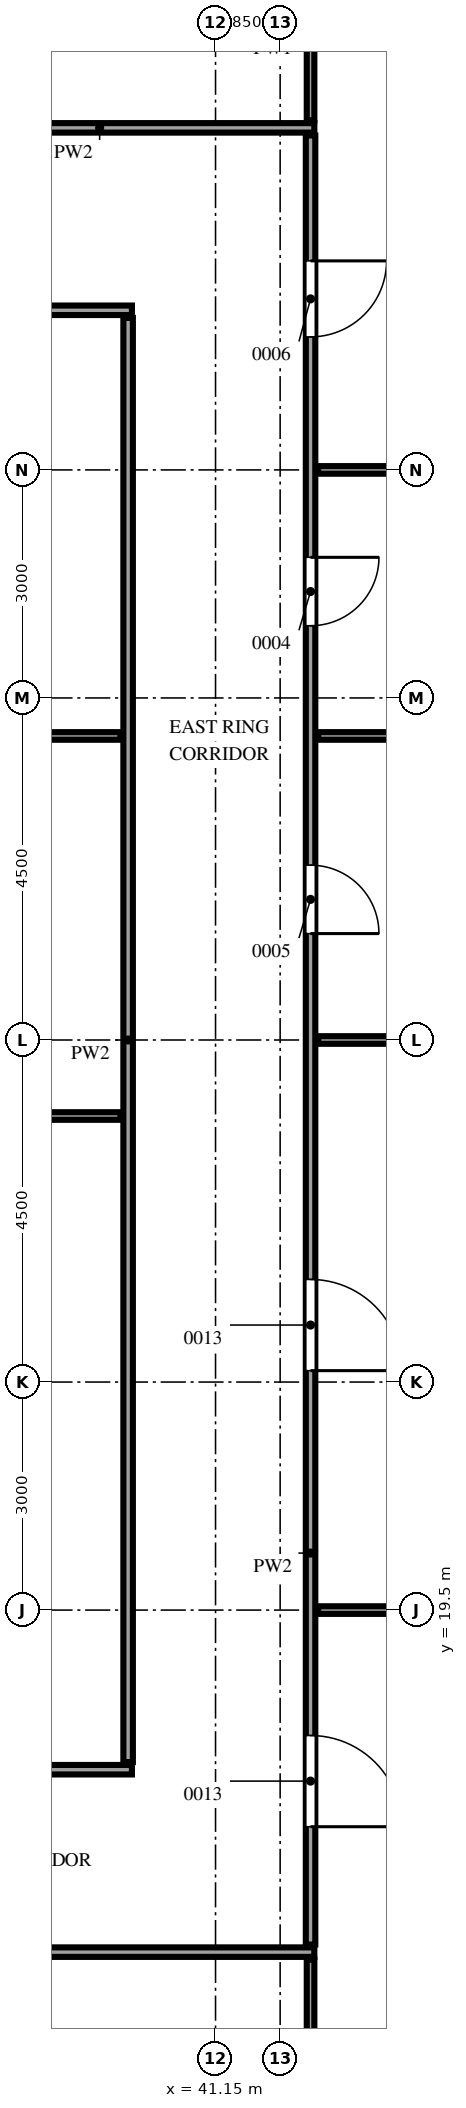
"""IFC4 building model, lengths in metres.
Left out: names, types, materials, properties, quantities, classifications, styles, units other than length and angle.
Written with IfcOpenShell. Run it as: python <this file> out.ifc"""

import sys

from ifc_helpers import new_model, si_unit, direction, frame, frame_2d, origin, place, context, subcontext, project, spatial, rectangle, extrude, source, transform, mapped, element, fill, save


model = new_model("IFC4")
c1 = context("Model", 3, precision=1e-05, world=origin(), true_north=direction((0.0, 1.0)))
c2 = subcontext(c1, "Body", "Model", "MODEL_VIEW")
j1 = project(units=[si_unit("LENGTHUNIT", "METRE"), si_unit("PLANEANGLEUNIT", "RADIAN")], contexts=[c1])
p1 = place(None, origin())
s1 = spatial("IfcSite", under=j1, at=p1, CompositionType="ELEMENT")
p2 = place(p1, origin())
s2 = spatial("IfcBuilding", under=s1, at=p2, CompositionType="ELEMENT")
p3 = place(p2, frame((0.0, 0.0, 306.2)))
s3 = spatial("IfcBuildingStorey", under=s2, at=p3, CompositionType="ELEMENT", Elevation=306.2)
m1 = source(origin(), c2, "Body", "SweptSolid", [
    extrude(rectangle(XDim=2.75, YDim=0.1, at=frame_2d((1.375, 0.0))), origin(), (0.0, 0.0, 1.0), 3.8),
])
p4 = place(p3, frame((42.4, 12.15, 0.0), z_axis=(0.0, 0.0, 1.0), x_axis=(0.0, 1.0, 0.0)))
e1 = element("IfcWall", 1, at=p4, inside=s3, PredefinedType="PARTITIONING", context=c2, shape_type="MappedRepresentation", body=[
    mapped(m1, transform((0.0, 0.0, 0.0))),
])
m2 = source(origin(), c2, "Body", "SweptSolid", [
    extrude(rectangle(XDim=19.1, YDim=0.125, at=frame_2d((9.55, 0.0))), origin(), (0.0, 0.0, 1.0), 3.8),
])
p5 = place(p3, frame((23.35, 15.0, 0.0), z_axis=(0.0, 0.0, 1.0), x_axis=(1.0, 0.0, 0.0)))
e2 = element("IfcWall", 2, at=p5, inside=s3, PredefinedType="PARTITIONING", context=c2, shape_type="MappedRepresentation", body=[
    mapped(m2, transform((0.0, 0.0, 0.0))),
])
m3 = source(origin(), c2, "Body", "SweptSolid", [
    extrude(rectangle(XDim=1.2, YDim=2.1, at=frame_2d((0.6, 1.05))), frame((0.0, 0.073, 0.0), z_axis=(0.0, -1.0, 0.0), x_axis=(1.0, 0.0, 0.0)), (0.0, 0.0, 1.0), 0.145),
])
p6 = place(p5, frame((7.75, 0.0, 0.0)))
e3 = element("IfcOpeningElement", 3, at=p6, cuts=e2, PredefinedType="OPENING", context=c2, shape_type="MappedRepresentation", body=[
    mapped(m3, transform((0.0, 0.0, 0.0))),
])
m4 = source(origin(), c2, "Body", "SweptSolid", [
    extrude(rectangle(XDim=23.8, YDim=0.125, at=frame_2d((11.9, 0.0))), origin(), (0.0, 0.0, 1.0), 3.8),
])
p7 = place(p3, frame((42.4, 15.1, 0.0), z_axis=(0.0, 0.0, 1.0), x_axis=(0.0, 1.0, 0.0)))
e4 = element("IfcWall", 4, at=p7, inside=s3, PredefinedType="PARTITIONING", context=c2, shape_type="MappedRepresentation", body=[
    mapped(m4, transform((0.0, 0.0, 0.0))),
])
p8 = place(p7, frame((1.55, 0.0, 0.0)))
e5 = element("IfcOpeningElement", 5, at=p8, cuts=e4, PredefinedType="OPENING", context=c2, shape_type="MappedRepresentation", body=[
    mapped(m3, transform((0.0, 0.0, 0.0))),
])
p9 = place(p7, frame((7.55, 0.0, 0.0)))
e6 = element("IfcOpeningElement", 6, at=p9, cuts=e4, PredefinedType="OPENING", context=c2, shape_type="MappedRepresentation", body=[
    mapped(m3, transform((0.0, 0.0, 0.0))),
])
m5 = source(origin(), c2, "Body", "SweptSolid", [
    extrude(rectangle(XDim=0.9, YDim=2.1, at=frame_2d((0.45, 1.05))), frame((0.0, 0.073, 0.0), z_axis=(0.0, -1.0, 0.0), x_axis=(1.0, 0.0, 0.0)), (0.0, 0.0, 1.0), 0.145),
])
p10 = place(p7, frame((13.3, 0.0, 0.0)))
e7 = element("IfcOpeningElement", 7, at=p10, cuts=e4, PredefinedType="OPENING", context=c2, shape_type="MappedRepresentation", body=[
    mapped(m5, transform((0.0, 0.0, 0.0))),
])
p11 = place(p7, frame((17.35, 0.0, 0.0)))
e8 = element("IfcOpeningElement", 8, at=p11, cuts=e4, PredefinedType="OPENING", context=c2, shape_type="MappedRepresentation", body=[
    mapped(m5, transform((0.0, 0.0, 0.0))),
])
m6 = source(origin(), c2, "Body", "SweptSolid", [
    extrude(rectangle(XDim=1.0, YDim=2.1, at=frame_2d((0.5, 1.05))), frame((0.0, 0.073, 0.0), z_axis=(0.0, -1.0, 0.0), x_axis=(1.0, 0.0, 0.0)), (0.0, 0.0, 1.0), 0.145),
])
p12 = place(p7, frame((21.15, 0.0, 0.0)))
e9 = element("IfcOpeningElement", 9, at=p12, cuts=e4, PredefinedType="OPENING", context=c2, shape_type="MappedRepresentation", body=[
    mapped(m6, transform((0.0, 0.0, 0.0))),
])
m7 = source(origin(), c2, "Body", "SweptSolid", [
    extrude(rectangle(XDim=16.7, YDim=0.125, at=frame_2d((8.35, 0.0))), origin(), (0.0, 0.0, 1.0), 3.8),
])
p13 = place(p3, frame((23.35, 17.4, 0.0), z_axis=(0.0, 0.0, 1.0), x_axis=(1.0, 0.0, 0.0)))
e10 = element("IfcWall", 10, at=p13, inside=s3, PredefinedType="PARTITIONING", context=c2, shape_type="MappedRepresentation", body=[
    mapped(m7, transform((0.0, 0.0, 0.0))),
])
p14 = place(p13, frame((7.75, 0.0, 0.0)))
e11 = element("IfcOpeningElement", 11, at=p14, cuts=e10, PredefinedType="OPENING", context=c2, shape_type="MappedRepresentation", body=[
    mapped(m3, transform((0.0, 0.0, 0.0))),
])
m8 = source(origin(), c2, "Body", "SweptSolid", [
    extrude(rectangle(XDim=19.0, YDim=0.125, at=frame_2d((9.5, 0.0))), origin(), (0.0, 0.0, 1.0), 3.8),
])
p15 = place(p3, frame((40.0, 17.5, 0.0), z_axis=(0.0, 0.0, 1.0), x_axis=(0.0, 1.0, 0.0)))
e12 = element("IfcWall", 12, at=p15, inside=s3, PredefinedType="PARTITIONING", context=c2, shape_type="MappedRepresentation", body=[
    mapped(m8, transform((0.0, 0.0, 0.0))),
])
m9 = source(origin(), c2, "Body", "SweptSolid", [
    extrude(rectangle(XDim=5.35, YDim=0.1, at=frame_2d((2.675, 0.0))), origin(), (0.0, 0.0, 1.0), 3.8),
])
p16 = place(p3, frame((42.5, 19.5, 0.0), z_axis=(0.0, 0.0, 1.0), x_axis=(1.0, 0.0, 0.0)))
e13 = element("IfcWall", 13, at=p16, inside=s3, PredefinedType="PARTITIONING", context=c2, shape_type="MappedRepresentation", body=[
    mapped(m9, transform((0.0, 0.0, 0.0))),
])
m10 = source(origin(), c2, "Body", "SweptSolid", [
    extrude(rectangle(XDim=16.4, YDim=0.1, at=frame_2d((8.2, 0.0))), origin(), (0.0, 0.0, 1.0), 3.8),
])
p17 = place(p3, frame((23.5, 26.0, 0.0), z_axis=(0.0, 0.0, 1.0), x_axis=(1.0, 0.0, 0.0)))
e14 = element("IfcWall", 14, at=p17, inside=s3, PredefinedType="PARTITIONING", context=c2, shape_type="MappedRepresentation", body=[
    mapped(m10, transform((0.0, 0.0, 0.0))),
])
p18 = place(p3, frame((42.5, 27.0, 0.0), z_axis=(0.0, 0.0, 1.0), x_axis=(1.0, 0.0, 0.0)))
e15 = element("IfcWall", 15, at=p18, inside=s3, PredefinedType="PARTITIONING", context=c2, shape_type="MappedRepresentation", body=[
    mapped(m9, transform((0.0, 0.0, 0.0))),
])
p19 = place(p3, frame((23.5, 31.0, 0.0), z_axis=(0.0, 0.0, 1.0), x_axis=(1.0, 0.0, 0.0)))
e16 = element("IfcWall", 16, at=p19, inside=s3, PredefinedType="PARTITIONING", context=c2, shape_type="MappedRepresentation", body=[
    mapped(m10, transform((0.0, 0.0, 0.0))),
])
for number, where, z_axis, x_axis in (
    (17, (42.5, 31.0, 0.0), (0.0, 0.0, 1.0), (1.0, 0.0, 0.0)),
    (18, (42.5, 34.5, 0.0), (0.0, 0.0, 1.0), (1.0, 0.0, 0.0)),
):
    element("IfcWall", number, at=place(p3, frame(where, z_axis=z_axis, x_axis=x_axis)), inside=s3, PredefinedType="PARTITIONING", context=c2, shape_type="MappedRepresentation", body=[
        mapped(m9, transform((0.0, 0.0, 0.0))),
    ])
p20 = place(p3, frame((23.35, 36.6, 0.0), z_axis=(0.0, 0.0, 1.0), x_axis=(1.0, 0.0, 0.0)))
e19 = element("IfcWall", 19, at=p20, inside=s3, PredefinedType="PARTITIONING", context=c2, shape_type="MappedRepresentation", body=[
    mapped(m7, transform((0.0, 0.0, 0.0))),
])
p21 = place(p20, frame((8.05, 0.0, 0.0)))
e20 = element("IfcOpeningElement", 20, at=p21, cuts=e19, PredefinedType="OPENING", context=c2, shape_type="MappedRepresentation", body=[
    mapped(m5, transform((0.0, 0.0, 0.0))),
])
m11 = source(origin(), c2, "Body", "SweptSolid", [
    extrude(rectangle(XDim=12.1, YDim=0.125, at=frame_2d((6.05, 0.0))), origin(), (0.0, 0.0, 1.0), 3.8),
])
p22 = place(p3, frame((30.35, 39.0, 0.0), z_axis=(0.0, 0.0, 1.0), x_axis=(1.0, 0.0, 0.0)))
e21 = element("IfcWall", 21, at=p22, inside=s3, PredefinedType="PARTITIONING", context=c2, shape_type="MappedRepresentation", body=[
    mapped(m11, transform((0.0, 0.0, 0.0))),
])
p23 = place(p22, frame((5.25, 0.0, 0.0)))
e22 = element("IfcOpeningElement", 22, at=p23, cuts=e21, PredefinedType="OPENING", context=c2, shape_type="MappedRepresentation", body=[
    mapped(m3, transform((0.0, 0.0, 0.0))),
])
p24 = place(p3, frame((42.4, 39.1, 0.0), z_axis=(0.0, 0.0, 1.0), x_axis=(0.0, 1.0, 0.0)))
e23 = element("IfcWall", 23, at=p24, inside=s3, PredefinedType="PARTITIONING", context=c2, shape_type="MappedRepresentation", body=[
    mapped(m1, transform((0.0, 0.0, 0.0))),
])
m12 = source(origin(), c2, "Body", "SweptSolid", [
    extrude(rectangle(XDim=1.2, YDim=2.1, at=frame_2d((0.6, 1.05))), frame((0.0, 0.025, 0.0), z_axis=(0.0, -1.0, 0.0), x_axis=(1.0, 0.0, 0.0)), (0.0, 0.0, 1.0), 0.05),
])
p25 = place(p8, origin())
e24 = element("IfcDoor", 24, at=p25, inside=s3, OperationType="SINGLE_SWING_LEFT", PredefinedType="DOOR", context=c2, shape_type="MappedRepresentation", body=[
    mapped(m12, transform((0.0, 0.0, 0.0))),
])
fill(e5, e24)
p26 = place(p9, origin())
e25 = element("IfcDoor", 25, at=p26, inside=s3, OperationType="SINGLE_SWING_LEFT", PredefinedType="DOOR", context=c2, shape_type="MappedRepresentation", body=[
    mapped(m12, transform((0.0, 0.0, 0.0))),
])
fill(e6, e25)
m13 = source(origin(), c2, "Body", "SweptSolid", [
    extrude(rectangle(XDim=0.9, YDim=2.1, at=frame_2d((0.45, 1.05))), frame((0.0, 0.025, 0.0), z_axis=(0.0, -1.0, 0.0), x_axis=(1.0, 0.0, 0.0)), (0.0, 0.0, 1.0), 0.05),
])
p27 = place(p10, origin())
e26 = element("IfcDoor", 26, at=p27, inside=s3, OperationType="SINGLE_SWING_LEFT", PredefinedType="DOOR", context=c2, shape_type="MappedRepresentation", body=[
    mapped(m13, transform((0.0, 0.0, 0.0))),
])
fill(e7, e26)
p28 = place(p11, origin())
e27 = element("IfcDoor", 27, at=p28, inside=s3, OperationType="SINGLE_SWING_RIGHT", PredefinedType="DOOR", context=c2, shape_type="MappedRepresentation", body=[
    mapped(m13, transform((0.0, 0.0, 0.0))),
])
fill(e8, e27)
m14 = source(origin(), c2, "Body", "SweptSolid", [
    extrude(rectangle(XDim=1.0, YDim=2.1, at=frame_2d((0.5, 1.05))), frame((0.0, 0.025, 0.0), z_axis=(0.0, -1.0, 0.0), x_axis=(1.0, 0.0, 0.0)), (0.0, 0.0, 1.0), 0.05),
])
p29 = place(p12, origin())
e28 = element("IfcDoor", 28, at=p29, inside=s3, OperationType="SINGLE_SWING_RIGHT", PredefinedType="DOOR", context=c2, shape_type="MappedRepresentation", body=[
    mapped(m14, transform((0.0, 0.0, 0.0))),
])
fill(e9, e28)
save(model, sys.argv[1])
